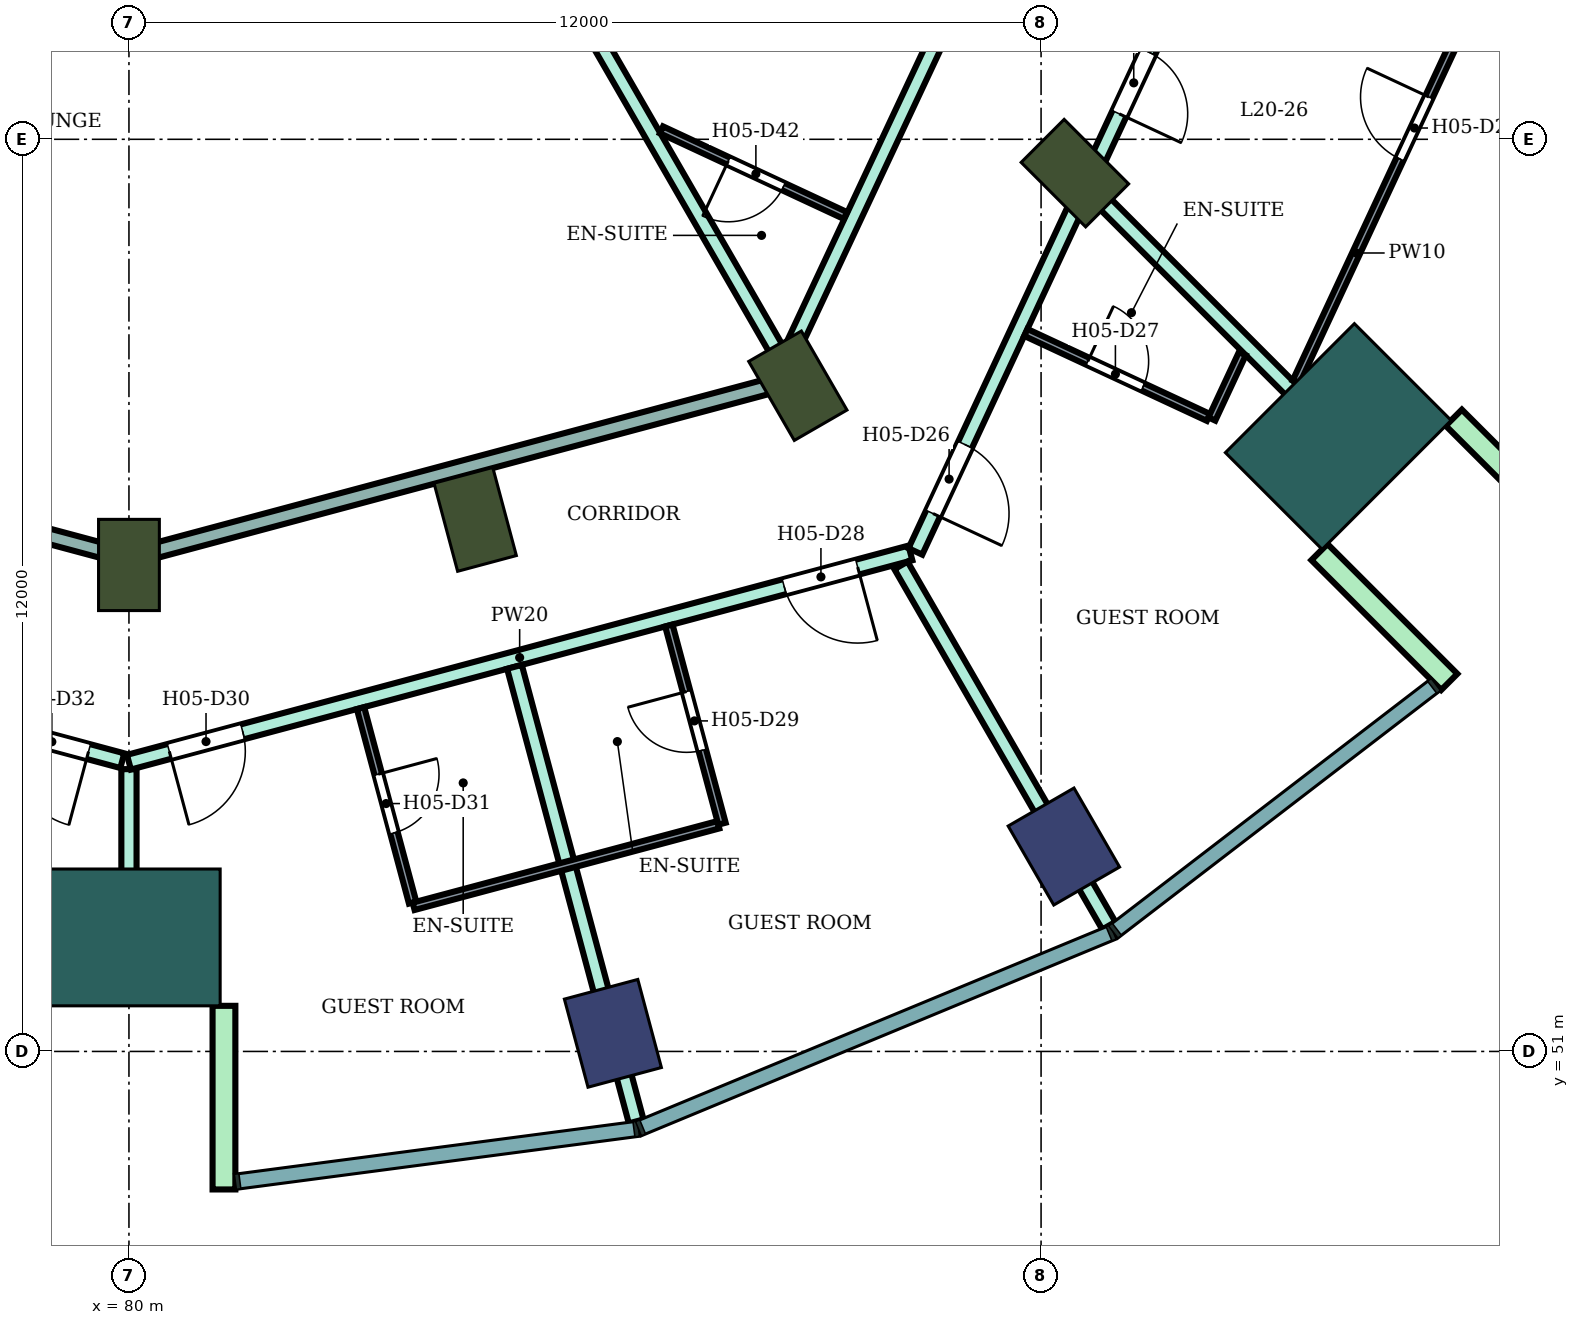
"""IFC4 building model, lengths in metres.
Left out: names, types, materials, properties, quantities, classifications, styles, units other than length and angle.
Written with IfcOpenShell. Run it as: python <this file> out.ifc"""

import sys

from ifc_helpers import new_model, si_unit, direction, frame, frame_2d, origin, origin_2d, place, context, subcontext, project, spatial, rectangle, extrude, element, fill, save


model = new_model("IFC4")
c1 = context("Model", 3, precision=1e-05, world=origin(), true_north=direction((0.0, 1.0)))
c2 = subcontext(c1, "Body", "Model", "MODEL_VIEW")
j1 = project(units=[si_unit("LENGTHUNIT", "METRE"), si_unit("PLANEANGLEUNIT", "RADIAN")], contexts=[c1])
p1 = place(None, origin())
s1 = spatial("IfcSite", under=j1, at=p1, CompositionType="ELEMENT")
p2 = place(p1, origin())
s2 = spatial("IfcBuilding", under=s1, at=p2, CompositionType="ELEMENT")
p3 = place(p2, frame((0.0, 0.0, 90.0)))
s3 = spatial("IfcBuildingStorey", under=s2, at=p3, CompositionType="ELEMENT", Elevation=90.0)
for number, where, z_axis, x_axis in (
    (1, (86.367, 51.238, 0.0), (0.0, 0.0, 1.0), (0.259, -0.966, 0.0)),
    (2, (92.3, 53.696, 0.0), (0.0, 0.0, 1.0), (0.5, -0.866, 0.0)),
):
    element("IfcColumn", number, at=place(p3, frame(where, z_axis=z_axis, x_axis=x_axis)), inside=s3, PredefinedType="COLUMN", context=c2, shape_type="SweptSolid", body=[
        extrude(rectangle(XDim=1.2, YDim=1.0, at=origin_2d()), origin(), (0.0, 0.0, 1.0), 3.8),
    ])
for number, where, z_axis, x_axis in (
    (3, (80.0, 57.4, 0.0), (0.0, 0.0, 1.0), (0.0, -1.0, 0.0)),
    (4, (84.555, 58.0, 0.0), (0.0, 0.0, 1.0), (0.259, -0.966, 0.0)),
    (5, (88.8, 59.758, 0.0), (0.0, 0.0, 1.0), (0.5, -0.866, 0.0)),
    (6, (92.445, 62.555, 0.0), (0.0, 0.0, 1.0), (0.707, -0.707, 0.0)),
):
    element("IfcColumn", number, at=place(p3, frame(where, z_axis=z_axis, x_axis=x_axis)), inside=s3, PredefinedType="COLUMN", context=c2, shape_type="SweptSolid", body=[
        extrude(rectangle(XDim=1.2, YDim=0.8, at=origin_2d()), origin(), (0.0, 0.0, 1.0), 3.8),
    ])
for number, where, z_axis, x_axis in (
    (7, (80.0, 52.5, 0.0), (0.0, 0.0, 1.0), (0.0, -1.0, 0.0)),
    (8, (95.91, 59.09, 0.0), (0.0, 0.0, 1.0), (0.707, -0.707, 0.0)),
):
    element("IfcColumn", number, at=place(p3, frame(where, z_axis=z_axis, x_axis=x_axis)), inside=s3, PredefinedType="COLUMN", context=c2, shape_type="SweptSolid", body=[
        extrude(rectangle(XDim=1.8, YDim=2.4, at=origin_2d()), origin(), (0.0, 0.0, 1.0), 3.8),
    ])
for number, where, z_axis, x_axis in (
    (9, (81.25, 51.6, 0.0), (0.0, 0.0, 1.0), (0.0, -1.0, 0.0)),
    (10, (95.662, 57.57, 0.0), (0.0, 0.0, 1.0), (0.707, -0.707, 0.0)),
    (11, (97.43, 59.338, 0.0), (0.0, 0.0, 1.0), (0.707, -0.707, 0.0)),
):
    element("IfcWall", number, at=place(p3, frame(where, z_axis=z_axis, x_axis=x_axis)), inside=s3, PredefinedType="NOTDEFINED", context=c2, shape_type="SweptSolid", body=[
        extrude(rectangle(XDim=2.416, YDim=0.3, at=frame_2d((1.208, 0.0))), origin(), (0.0, 0.0, 1.0), 3.8),
    ])
p4 = place(p3, frame((69.652, 57.578, 0.0), z_axis=(0.0, 0.0, 1.0), x_axis=(0.965857425723, -0.259074184695, 0.0)))
e12 = element("IfcWall", 12, at=p4, inside=s3, PredefinedType="PARTITIONING", context=c2, shape_type="SweptSolid", body=[
    extrude(rectangle(XDim=10.623, YDim=0.2, at=frame_2d((5.312, 0.0))), origin(), (0.0, 0.0, 1.0), 3.35),
])
p5 = place(p4, frame((9.163, 0.0, 0.0)))
e13 = element("IfcOpeningElement", 13, at=p5, cuts=e12, PredefinedType="OPENING", context=c2, shape_type="SweptSolid", body=[
    extrude(rectangle(XDim=1.0, YDim=2.1, at=frame_2d((0.5, 1.05))), frame((0.0, 0.11, 0.0), z_axis=(0.0, -1.0, 0.0), x_axis=(1.0, 0.0, 0.0)), (0.0, 0.0, 1.0), 0.22),
])
p6 = place(p4, frame((0.788, 0.0, 0.0)))
e14 = element("IfcOpeningElement", 14, at=p6, cuts=e12, PredefinedType="OPENING", context=c2, shape_type="SweptSolid", body=[
    extrude(rectangle(XDim=1.0, YDim=2.1, at=frame_2d((0.5, 1.05))), frame((0.0, 0.11, 0.0), z_axis=(0.0, -1.0, 0.0), x_axis=(1.0, 0.0, 0.0)), (0.0, 0.0, 1.0), 0.22),
])
p7 = place(p3, frame((71.498, 59.774, 0.0), z_axis=(0.0, 0.0, 1.0), x_axis=(0.965911938046, -0.258870871168, 0.0)))
e15 = element("IfcWall", 15, at=p7, inside=s3, PredefinedType="PARTITIONING", context=c2, shape_type="SweptSolid", body=[
    extrude(rectangle(XDim=8.752, YDim=0.2, at=frame_2d((4.376, 0.0))), origin(), (0.0, 0.0, 1.0), 2.98),
])
p8 = place(p7, frame((4.701, 0.0, 0.0)))
e16 = element("IfcOpeningElement", 16, at=p8, cuts=e15, PredefinedType="OPENING", context=c2, shape_type="SweptSolid", body=[
    extrude(rectangle(XDim=1.8, YDim=2.1, at=frame_2d((0.9, 1.05))), frame((0.0, 0.11, 0.0), z_axis=(0.0, -1.0, 0.0), x_axis=(1.0, 0.0, 0.0)), (0.0, 0.0, 1.0), 0.22),
])
p9 = place(p3, frame((80.0, 51.8, 0.0), z_axis=(0.0, 0.0, 1.0), x_axis=(0.0, 1.0, 0.0)))
e17 = element("IfcWall", 17, at=p9, inside=s3, PredefinedType="PARTITIONING", context=c2, shape_type="SweptSolid", body=[
    extrude(rectangle(XDim=2.914, YDim=0.2, at=frame_2d((1.457, 0.0))), origin(), (0.0, 0.0, 1.0), 3.35),
])
p10 = place(p3, frame((80.0, 54.805, 0.0), z_axis=(0.0, 0.0, 1.0), x_axis=(0.965962177934, 0.258683340788, 0.0)))
e18 = element("IfcWall", 18, at=p10, inside=s3, PredefinedType="PARTITIONING", context=c2, shape_type="SweptSolid", body=[
    extrude(rectangle(XDim=10.643, YDim=0.2, at=frame_2d((5.322, 0.0))), origin(), (0.0, 0.0, 1.0), 3.35),
])
p11 = place(p10, frame((8.925, 0.0, 0.0)))
e19 = element("IfcOpeningElement", 19, at=p11, cuts=e18, PredefinedType="OPENING", context=c2, shape_type="SweptSolid", body=[
    extrude(rectangle(XDim=1.0, YDim=2.1, at=frame_2d((0.5, 1.05))), frame((0.0, 0.11, 0.0), z_axis=(0.0, -1.0, 0.0), x_axis=(1.0, 0.0, 0.0)), (0.0, 0.0, 1.0), 0.22),
])
p12 = place(p10, frame((0.55, 0.0, 0.0)))
e20 = element("IfcOpeningElement", 20, at=p12, cuts=e18, PredefinedType="OPENING", context=c2, shape_type="SweptSolid", body=[
    extrude(rectangle(XDim=1.0, YDim=2.1, at=frame_2d((0.5, 1.05))), frame((0.0, 0.11, 0.0), z_axis=(0.0, -1.0, 0.0), x_axis=(1.0, 0.0, 0.0)), (0.0, 0.0, 1.0), 0.22),
])
p13 = place(p3, frame((80.0, 57.496, 0.0), z_axis=(0.0, 0.0, 1.0), x_axis=(0.96592471314, 0.258823199396, 0.0)))
e21 = element("IfcWall", 21, at=p13, inside=s3, PredefinedType="PARTITIONING", context=c2, shape_type="SweptSolid", body=[
    extrude(rectangle(XDim=8.732, YDim=0.2, at=frame_2d((4.366, 0.0))), origin(), (0.0, 0.0, 1.0), 2.98),
])
p14 = place(p3, frame((83.846, 68.33, 0.0), z_axis=(0.0, 0.0, 1.0), x_axis=(0.499822319857, -0.866127963163, 0.0)))
e22 = element("IfcWall", 22, at=p14, inside=s3, PredefinedType="PARTITIONING", context=c2, shape_type="SweptSolid", body=[
    extrude(rectangle(XDim=9.382, YDim=0.2, at=frame_2d((4.691, 0.0))), origin(), (0.0, 0.0, 1.0), 3.35),
])
p15 = place(p3, frame((85.072, 56.06, 0.0), z_axis=(0.0, 0.0, 1.0), x_axis=(0.258703231129, -0.965956851109, 0.0)))
e23 = element("IfcWall", 23, at=p15, inside=s3, PredefinedType="PARTITIONING", context=c2, shape_type="SweptSolid", body=[
    extrude(rectangle(XDim=6.191, YDim=0.2, at=frame_2d((3.095, 0.0))), origin(), (0.0, 0.0, 1.0), 3.35),
])
p16 = place(p3, frame((88.501, 59.775, 0.0), z_axis=(0.0, 0.0, 1.0), x_axis=(0.424700525505, 0.905333896215, 0.0)))
e24 = element("IfcWall", 24, at=p16, inside=s3, PredefinedType="PARTITIONING", context=c2, shape_type="SweptSolid", body=[
    extrude(rectangle(XDim=7.53, YDim=0.2, at=frame_2d((3.765, 0.0))), origin(), (0.0, 0.0, 1.0), 3.35),
])
p17 = place(p16, frame((5.83, 0.0, 0.0)))
e25 = element("IfcOpeningElement", 25, at=p17, cuts=e24, PredefinedType="OPENING", context=c2, shape_type="SweptSolid", body=[
    extrude(rectangle(XDim=1.0, YDim=2.1, at=frame_2d((0.5, 1.05))), frame((0.0, 0.11, 0.0), z_axis=(0.0, -1.0, 0.0), x_axis=(1.0, 0.0, 0.0)), (0.0, 0.0, 1.0), 0.22),
])
p18 = place(p3, frame((90.157, 57.394, 0.0), z_axis=(0.0, 0.0, 1.0), x_axis=(0.499815153866, -0.86613209845, 0.0)))
e26 = element("IfcWall", 26, at=p18, inside=s3, PredefinedType="PARTITIONING", context=c2, shape_type="SweptSolid", body=[
    extrude(rectangle(XDim=5.472, YDim=0.2, at=frame_2d((2.736, 0.0))), origin(), (0.0, 0.0, 1.0), 3.35),
])
p19 = place(p3, frame((90.346, 57.578, 0.0), z_axis=(0.0, 0.0, 1.0), x_axis=(0.422403412327, 0.906407941964, 0.0)))
e27 = element("IfcWall", 27, at=p19, inside=s3, PredefinedType="PARTITIONING", context=c2, shape_type="SweptSolid", body=[
    extrude(rectangle(XDim=8.208, YDim=0.2, at=frame_2d((4.104, 0.0))), origin(), (0.0, 0.0, 1.0), 3.35),
])
p20 = place(p19, frame((6.351, 0.0, 0.0)))
e28 = element("IfcOpeningElement", 28, at=p20, cuts=e27, PredefinedType="OPENING", context=c2, shape_type="SweptSolid", body=[
    extrude(rectangle(XDim=0.9, YDim=2.1, at=frame_2d((0.45, 1.05))), frame((0.0, 0.11, 0.0), z_axis=(0.0, -1.0, 0.0), x_axis=(1.0, 0.0, 0.0)), (0.0, 0.0, 1.0), 0.22),
])
p21 = place(p19, frame((0.55, 0.0, 0.0)))
e29 = element("IfcOpeningElement", 29, at=p21, cuts=e27, PredefinedType="OPENING", context=c2, shape_type="SweptSolid", body=[
    extrude(rectangle(XDim=1.0, YDim=2.1, at=frame_2d((0.5, 1.05))), frame((0.0, 0.11, 0.0), z_axis=(0.0, -1.0, 0.0), x_axis=(1.0, 0.0, 0.0)), (0.0, 0.0, 1.0), 0.22),
])
p22 = place(p3, frame((92.692, 62.303, 0.0), z_axis=(0.0, 0.0, 1.0), x_axis=(0.706920663731, -0.707292849667, 0.0)))
e30 = element("IfcWall", 30, at=p22, inside=s3, PredefinedType="PARTITIONING", context=c2, shape_type="SweptSolid", body=[
    extrude(rectangle(XDim=5.248, YDim=0.2, at=frame_2d((2.624, 0.0))), origin(), (0.0, 0.0, 1.0), 3.35),
])
p23 = place(p3, frame((83.047, 55.516, 0.0), z_axis=(0.0, 0.0, 1.0), x_axis=(0.258677737588, -0.965963678446, 0.0)))
e31 = element("IfcWall", 31, at=p23, inside=s3, PredefinedType="PARTITIONING", context=c2, shape_type="SweptSolid", body=[
    extrude(rectangle(XDim=2.649, YDim=0.1, at=frame_2d((1.325, 0.0))), origin(), (0.0, 0.0, 1.0), 3.35),
])
p24 = place(p23, frame((0.9, 0.0, 0.0)))
e32 = element("IfcOpeningElement", 32, at=p24, cuts=e31, PredefinedType="OPENING", context=c2, shape_type="SweptSolid", body=[
    extrude(rectangle(XDim=0.8, YDim=2.1, at=frame_2d((0.4, 1.05))), frame((0.0, 0.06, 0.0), z_axis=(0.0, -1.0, 0.0), x_axis=(1.0, 0.0, 0.0)), (0.0, 0.0, 1.0), 0.12),
])
p25 = place(p3, frame((83.745, 52.909, 0.0), z_axis=(0.0, 0.0, 1.0), x_axis=(0.965995295758, 0.258559642196, 0.0)))
e33 = element("IfcWall", 33, at=p25, inside=s3, PredefinedType="PARTITIONING", context=c2, shape_type="SweptSolid", body=[
    extrude(rectangle(XDim=4.15, YDim=0.1, at=frame_2d((2.075, 0.0))), origin(), (0.0, 0.0, 1.0), 3.35),
])
p26 = place(p3, frame((87.006, 63.124, 0.0), z_axis=(0.0, 0.0, 1.0), x_axis=(0.906535604863, -0.422129360642, 0.0)))
e34 = element("IfcWall", 34, at=p26, inside=s3, PredefinedType="PARTITIONING", context=c2, shape_type="SweptSolid", body=[
    extrude(rectangle(XDim=2.67, YDim=0.1, at=frame_2d((1.335, 0.0))), origin(), (0.0, 0.0, 1.0), 3.35),
])
p27 = place(p26, frame((0.97, 0.0, 0.0)))
e35 = element("IfcOpeningElement", 35, at=p27, cuts=e34, PredefinedType="OPENING", context=c2, shape_type="SweptSolid", body=[
    extrude(rectangle(XDim=0.8, YDim=2.1, at=frame_2d((0.4, 1.05))), frame((0.0, 0.06, 0.0), z_axis=(0.0, -1.0, 0.0), x_axis=(1.0, 0.0, 0.0)), (0.0, 0.0, 1.0), 0.12),
])
p28 = place(p3, frame((87.103, 56.604, 0.0), z_axis=(0.0, 0.0, 1.0), x_axis=(0.258883730688, -0.965908491517, 0.0)))
e36 = element("IfcWall", 36, at=p28, inside=s3, PredefinedType="PARTITIONING", context=c2, shape_type="SweptSolid", body=[
    extrude(rectangle(XDim=2.7, YDim=0.1, at=frame_2d((1.35, 0.0))), origin(), (0.0, 0.0, 1.0), 3.35),
])
p29 = place(p28, frame((0.9, 0.0, 0.0)))
e37 = element("IfcOpeningElement", 37, at=p29, cuts=e36, PredefinedType="OPENING", context=c2, shape_type="SweptSolid", body=[
    extrude(rectangle(XDim=0.8, YDim=2.1, at=frame_2d((0.4, 1.05))), frame((0.0, 0.06, 0.0), z_axis=(0.0, -1.0, 0.0), x_axis=(1.0, 0.0, 0.0)), (0.0, 0.0, 1.0), 0.12),
])
p30 = place(p3, frame((91.8, 60.459, 0.0), z_axis=(0.0, 0.0, 1.0), x_axis=(0.906644059932, -0.421896371861, 0.0)))
e38 = element("IfcWall", 38, at=p30, inside=s3, PredefinedType="PARTITIONING", context=c2, shape_type="SweptSolid", body=[
    extrude(rectangle(XDim=2.649, YDim=0.1, at=frame_2d((1.325, 0.0))), origin(), (0.0, 0.0, 1.0), 3.35),
])
p31 = place(p30, frame((0.899, 0.0, 0.0)))
e39 = element("IfcOpeningElement", 39, at=p31, cuts=e38, PredefinedType="OPENING", context=c2, shape_type="SweptSolid", body=[
    extrude(rectangle(XDim=0.8, YDim=2.1, at=frame_2d((0.4, 1.05))), frame((0.0, 0.06, 0.0), z_axis=(0.0, -1.0, 0.0), x_axis=(1.0, 0.0, 0.0)), (0.0, 0.0, 1.0), 0.12),
])
p32 = place(p3, frame((94.247, 59.32, 0.0), z_axis=(0.0, 0.0, 1.0), x_axis=(0.422660124657, 0.906288264861, 0.0)))
e40 = element("IfcWall", 40, at=p32, inside=s3, PredefinedType="PARTITIONING", context=c2, shape_type="SweptSolid", body=[
    extrude(rectangle(XDim=0.949, YDim=0.1, at=frame_2d((0.475, 0.0))), origin(), (0.0, 0.0, 1.0), 3.35),
])
p33 = place(p3, frame((95.355, 59.806, 0.0), z_axis=(0.0, 0.0, 1.0), x_axis=(0.422407546544, 0.906406015328, 0.0)))
e41 = element("IfcWall", 41, at=p33, inside=s3, PredefinedType="PARTITIONING", context=c2, shape_type="SweptSolid", body=[
    extrude(rectangle(XDim=7.496, YDim=0.1, at=frame_2d((3.748, 0.0))), origin(), (0.0, 0.0, 1.0), 3.35),
])
p34 = place(p33, frame((3.238, 0.0, 0.0)))
e42 = element("IfcOpeningElement", 42, at=p34, cuts=e41, PredefinedType="OPENING", context=c2, shape_type="SweptSolid", body=[
    extrude(rectangle(XDim=0.9, YDim=2.1, at=frame_2d((0.45, 1.05))), frame((0.0, 0.06, 0.0), z_axis=(0.0, -1.0, 0.0), x_axis=(1.0, 0.0, 0.0)), (0.0, 0.0, 1.0), 0.12),
])
p35 = place(p20, frame((0.9, 0.0, 0.0), z_axis=(0.0, 0.0, 1.0), x_axis=(-1.0, 0.0, 0.0)))
e43 = element("IfcDoor", 43, at=p35, inside=s3, OperationType="SINGLE_SWING_RIGHT", PredefinedType="DOOR", context=c2, shape_type="SweptSolid", body=[
    extrude(rectangle(XDim=0.9, YDim=2.1, at=frame_2d((0.45, 1.05))), frame((0.0, 0.025, 0.0), z_axis=(0.0, -1.0, 0.0), x_axis=(1.0, 0.0, 0.0)), (0.0, 0.0, 1.0), 0.05),
])
fill(e28, e43)
p36 = place(p34, origin())
e44 = element("IfcDoor", 44, at=p36, inside=s3, OperationType="SINGLE_SWING_RIGHT", PredefinedType="DOOR", context=c2, shape_type="SweptSolid", body=[
    extrude(rectangle(XDim=0.9, YDim=2.1, at=frame_2d((0.45, 1.05))), frame((0.0, 0.025, 0.0), z_axis=(0.0, -1.0, 0.0), x_axis=(1.0, 0.0, 0.0)), (0.0, 0.0, 1.0), 0.05),
])
fill(e42, e44)
p37 = place(p21, frame((1.0, 0.0, 0.0), z_axis=(0.0, 0.0, 1.0), x_axis=(-1.0, 0.0, 0.0)))
e45 = element("IfcDoor", 45, at=p37, inside=s3, OperationType="SINGLE_SWING_RIGHT", PredefinedType="DOOR", context=c2, shape_type="SweptSolid", body=[
    extrude(rectangle(XDim=1.0, YDim=2.1, at=frame_2d((0.5, 1.05))), frame((0.0, 0.025, 0.0), z_axis=(0.0, -1.0, 0.0), x_axis=(1.0, 0.0, 0.0)), (0.0, 0.0, 1.0), 0.05),
])
fill(e29, e45)
p38 = place(p31, origin())
e46 = element("IfcDoor", 46, at=p38, inside=s3, OperationType="SINGLE_SWING_LEFT", PredefinedType="DOOR", context=c2, shape_type="SweptSolid", body=[
    extrude(rectangle(XDim=0.8, YDim=2.1, at=frame_2d((0.4, 1.05))), frame((0.0, 0.025, 0.0), z_axis=(0.0, -1.0, 0.0), x_axis=(1.0, 0.0, 0.0)), (0.0, 0.0, 1.0), 0.05),
])
fill(e39, e46)
p39 = place(p11, frame((1.0, 0.0, 0.0), z_axis=(0.0, 0.0, 1.0), x_axis=(-1.0, 0.0, 0.0)))
e47 = element("IfcDoor", 47, at=p39, inside=s3, OperationType="SINGLE_SWING_LEFT", PredefinedType="DOOR", context=c2, shape_type="SweptSolid", body=[
    extrude(rectangle(XDim=1.0, YDim=2.1, at=frame_2d((0.5, 1.05))), frame((0.0, 0.025, 0.0), z_axis=(0.0, -1.0, 0.0), x_axis=(1.0, 0.0, 0.0)), (0.0, 0.0, 1.0), 0.05),
])
fill(e19, e47)
p40 = place(p29, frame((0.8, 0.0, 0.0), z_axis=(0.0, 0.0, 1.0), x_axis=(-1.0, 0.0, 0.0)))
e48 = element("IfcDoor", 48, at=p40, inside=s3, OperationType="SINGLE_SWING_RIGHT", PredefinedType="DOOR", context=c2, shape_type="SweptSolid", body=[
    extrude(rectangle(XDim=0.8, YDim=2.1, at=frame_2d((0.4, 1.05))), frame((0.0, 0.025, 0.0), z_axis=(0.0, -1.0, 0.0), x_axis=(1.0, 0.0, 0.0)), (0.0, 0.0, 1.0), 0.05),
])
fill(e37, e48)
p41 = place(p12, frame((1.0, 0.0, 0.0), z_axis=(0.0, 0.0, 1.0), x_axis=(-1.0, 0.0, 0.0)))
e49 = element("IfcDoor", 49, at=p41, inside=s3, OperationType="SINGLE_SWING_RIGHT", PredefinedType="DOOR", context=c2, shape_type="SweptSolid", body=[
    extrude(rectangle(XDim=1.0, YDim=2.1, at=frame_2d((0.5, 1.05))), frame((0.0, 0.025, 0.0), z_axis=(0.0, -1.0, 0.0), x_axis=(1.0, 0.0, 0.0)), (0.0, 0.0, 1.0), 0.05),
])
fill(e20, e49)
p42 = place(p24, origin())
e50 = element("IfcDoor", 50, at=p42, inside=s3, OperationType="SINGLE_SWING_LEFT", PredefinedType="DOOR", context=c2, shape_type="SweptSolid", body=[
    extrude(rectangle(XDim=0.8, YDim=2.1, at=frame_2d((0.4, 1.05))), frame((0.0, 0.025, 0.0), z_axis=(0.0, -1.0, 0.0), x_axis=(1.0, 0.0, 0.0)), (0.0, 0.0, 1.0), 0.05),
])
fill(e32, e50)
p43 = place(p5, frame((1.0, 0.0, 0.0), z_axis=(0.0, 0.0, 1.0), x_axis=(-1.0, 0.0, 0.0)))
e51 = element("IfcDoor", 51, at=p43, inside=s3, OperationType="SINGLE_SWING_LEFT", PredefinedType="DOOR", context=c2, shape_type="SweptSolid", body=[
    extrude(rectangle(XDim=1.0, YDim=2.1, at=frame_2d((0.5, 1.05))), frame((0.0, 0.025, 0.0), z_axis=(0.0, -1.0, 0.0), x_axis=(1.0, 0.0, 0.0)), (0.0, 0.0, 1.0), 0.05),
])
fill(e13, e51)
p44 = place(p27, frame((0.8, 0.0, 0.0), z_axis=(0.0, 0.0, 1.0), x_axis=(-1.0, 0.0, 0.0)))
e52 = element("IfcDoor", 52, at=p44, inside=s3, OperationType="SINGLE_SWING_RIGHT", PredefinedType="DOOR", context=c2, shape_type="SweptSolid", body=[
    extrude(rectangle(XDim=0.8, YDim=2.1, at=frame_2d((0.4, 1.05))), frame((0.0, 0.025, 0.0), z_axis=(0.0, -1.0, 0.0), x_axis=(1.0, 0.0, 0.0)), (0.0, 0.0, 1.0), 0.05),
])
fill(e35, e52)
save(model, sys.argv[1])
